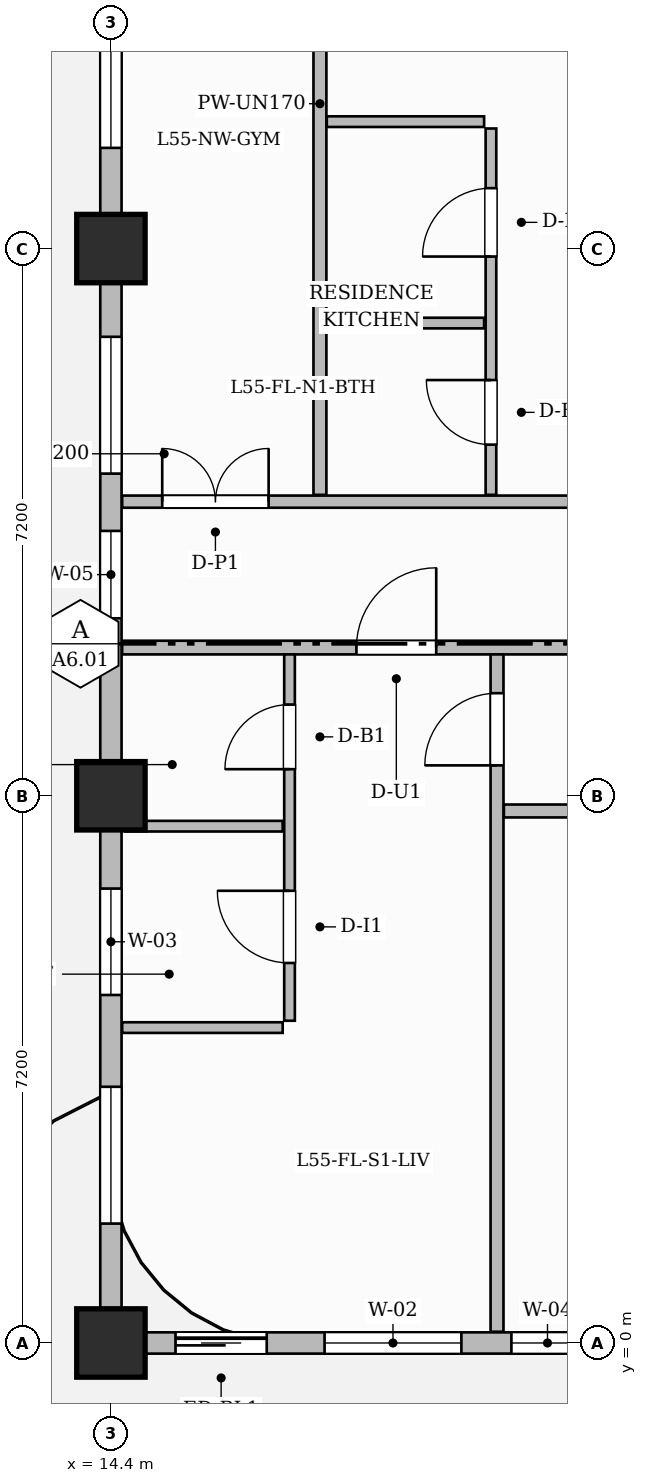
"""IFC4 building model, lengths in metres.
Left out: names, types, materials, properties, quantities, classifications, styles, units other than length and angle.
Written with IfcOpenShell. Run it as: python <this file> out.ifc"""

import sys

from ifc_helpers import new_model, si_unit, direction, frame, frame_2d, origin, origin_2d, place, context, subcontext, project, spatial, rectangle, extrude, source, transform, mapped, element, fill, save


model = new_model("IFC4")
c1 = context("Model", 3, precision=1e-05, world=origin(), true_north=direction((0.0, 1.0)))
c2 = subcontext(c1, "Body", "Model", "MODEL_VIEW")
j1 = project(units=[si_unit("LENGTHUNIT", "METRE"), si_unit("PLANEANGLEUNIT", "RADIAN")], contexts=[c1])
p1 = place(None, origin())
s1 = spatial("IfcSite", under=j1, at=p1, CompositionType="ELEMENT")
p2 = place(p1, origin())
s2 = spatial("IfcBuilding", under=s1, at=p2, CompositionType="ELEMENT")
p3 = place(p2, frame((0.0, 0.0, 221.15)))
s3 = spatial("IfcBuildingStorey", under=s2, at=p3, CompositionType="ELEMENT", Elevation=221.15)
m1 = source(origin(), c2, "Body", "SweptSolid", [
    extrude(rectangle(XDim=0.9, YDim=0.9, at=origin_2d()), origin(), (0.0, 0.0, 1.0), 3.85),
])
for number, where, z_axis, x_axis in (
    (1, (14.4, 0.0, 0.0), (0.0, 0.0, 1.0), (1.0, 0.0, 0.0)),
    (2, (14.4, 7.2, 0.0), (0.0, 0.0, 1.0), (1.0, 0.0, 0.0)),
    (3, (14.4, 14.4, 0.0), (0.0, 0.0, 1.0), (1.0, 0.0, 0.0)),
):
    element("IfcColumn", number, at=place(p3, frame(where, z_axis=z_axis, x_axis=x_axis)), inside=s3, PredefinedType="COLUMN", context=c2, shape_type="MappedRepresentation", body=[
        mapped(m1, transform((0.0, 0.0, 0.0), scale=1.0)),
    ])
p4 = place(p3, frame((14.548, 9.15, 0.0), z_axis=(0.0, 0.0, 1.0), x_axis=(1.0, 0.0, 0.0)))
e4 = element("IfcWall", 4, at=p4, inside=s3, PredefinedType="PARTITIONING", context=c2, shape_type="SweptSolid", body=[
    extrude(rectangle(XDim=15.562, YDim=0.18, at=frame_2d((7.781, 0.0))), origin(), (0.0, 0.0, 1.0), 3.6),
])
p5 = place(p4, frame((3.082, 0.0, 0.0)))
e5 = element("IfcOpeningElement", 5, at=p5, cuts=e4, PredefinedType="OPENING", context=c2, shape_type="SweptSolid", body=[
    extrude(rectangle(XDim=1.05, YDim=2.25, at=frame_2d((0.525, 1.125))), frame((0.0, 0.1, 0.0), z_axis=(0.0, -1.0, 0.0), x_axis=(1.0, 0.0, 0.0)), (0.0, 0.0, 1.0), 0.2),
])
p6 = place(p3, frame((14.548, 11.07, 0.0), z_axis=(0.0, 0.0, 1.0), x_axis=(1.0, 0.0, 0.0)))
e6 = element("IfcWall", 6, at=p6, inside=s3, PredefinedType="PARTITIONING", context=c2, shape_type="SweptSolid", body=[
    extrude(rectangle(XDim=15.562, YDim=0.16, at=frame_2d((7.781, 0.0))), origin(), (0.0, 0.0, 1.0), 3.6),
])
p7 = place(p6, frame((0.527, 0.0, 0.0)))
e7 = element("IfcOpeningElement", 7, at=p7, cuts=e6, PredefinedType="OPENING", context=c2, shape_type="SweptSolid", body=[
    extrude(rectangle(XDim=1.4, YDim=2.35, at=frame_2d((0.7, 1.175))), frame((0.0, 0.09, 0.0), z_axis=(0.0, -1.0, 0.0), x_axis=(1.0, 0.0, 0.0)), (0.0, 0.0, 1.0), 0.18),
])
p8 = place(p6, frame((6.527, 0.0, 0.0)))
e8 = element("IfcOpeningElement", 8, at=p8, cuts=e6, PredefinedType="OPENING", context=c2, shape_type="SweptSolid", body=[
    extrude(rectangle(XDim=1.05, YDim=2.25, at=frame_2d((0.525, 1.125))), frame((0.0, 0.09, 0.0), z_axis=(0.0, -1.0, 0.0), x_axis=(1.0, 0.0, 0.0)), (0.0, 0.0, 1.0), 0.18),
])
p9 = place(p3, frame((16.75, 4.24, 0.0), z_axis=(0.0, 0.0, 1.0), x_axis=(0.0, 1.0, 0.0)))
e9 = element("IfcWall", 9, at=p9, inside=s3, PredefinedType="PARTITIONING", context=c2, shape_type="SweptSolid", body=[
    extrude(rectangle(XDim=4.82, YDim=0.14, at=frame_2d((2.41, 0.0))), origin(), (0.0, 0.0, 1.0), 3.6),
])
p10 = place(p9, frame((0.76, 0.0, 0.0)))
e10 = element("IfcOpeningElement", 10, at=p10, cuts=e9, PredefinedType="OPENING", context=c2, shape_type="SweptSolid", body=[
    extrude(rectangle(XDim=0.95, YDim=2.15, at=frame_2d((0.475, 1.075))), frame((0.0, 0.08, 0.0), z_axis=(0.0, -1.0, 0.0), x_axis=(1.0, 0.0, 0.0)), (0.0, 0.0, 1.0), 0.16),
])
p11 = place(p9, frame((3.31, 0.0, 0.0)))
e11 = element("IfcOpeningElement", 11, at=p11, cuts=e9, PredefinedType="OPENING", context=c2, shape_type="SweptSolid", body=[
    extrude(rectangle(XDim=0.85, YDim=2.1, at=frame_2d((0.425, 1.05))), frame((0.0, 0.08, 0.0), z_axis=(0.0, -1.0, 0.0), x_axis=(1.0, 0.0, 0.0)), (0.0, 0.0, 1.0), 0.16),
])
p12 = place(p3, frame((14.59, 6.8, 0.0), z_axis=(0.0, 0.0, 1.0), x_axis=(1.0, 0.0, 0.0)))
e12 = element("IfcWall", 12, at=p12, inside=s3, PredefinedType="PARTITIONING", context=c2, shape_type="SweptSolid", body=[
    extrude(rectangle(XDim=2.07, YDim=0.14, at=frame_2d((1.035, 0.0))), origin(), (0.0, 0.0, 1.0), 3.6),
])
p13 = place(p3, frame((14.548, 4.15, 0.0), z_axis=(0.0, 0.0, 1.0), x_axis=(1.0, 0.0, 0.0)))
e13 = element("IfcWall", 13, at=p13, inside=s3, PredefinedType="PARTITIONING", context=c2, shape_type="SweptSolid", body=[
    extrude(rectangle(XDim=2.112, YDim=0.14, at=frame_2d((1.056, 0.0))), origin(), (0.0, 0.0, 1.0), 3.6),
])
p14 = place(p3, frame((19.48, 0.148, 0.0), z_axis=(0.0, 0.0, 1.0), x_axis=(0.0, 1.0, 0.0)))
e14 = element("IfcWall", 14, at=p14, inside=s3, PredefinedType="PARTITIONING", context=c2, shape_type="SweptSolid", body=[
    extrude(rectangle(XDim=8.912, YDim=0.17, at=frame_2d((4.456, 0.0))), origin(), (0.0, 0.0, 1.0), 3.6),
])
p15 = place(p14, frame((7.452, 0.0, 0.0)))
e15 = element("IfcOpeningElement", 15, at=p15, cuts=e14, PredefinedType="OPENING", context=c2, shape_type="SweptSolid", body=[
    extrude(rectangle(XDim=0.95, YDim=2.15, at=frame_2d((0.475, 1.075))), frame((0.0, 0.095, 0.0), z_axis=(0.0, -1.0, 0.0), x_axis=(1.0, 0.0, 0.0)), (0.0, 0.0, 1.0), 0.19),
])
p16 = place(p3, frame((19.57, 7.0, 0.0), z_axis=(0.0, 0.0, 1.0), x_axis=(1.0, 0.0, 0.0)))
e16 = element("IfcWall", 16, at=p16, inside=s3, PredefinedType="PARTITIONING", context=c2, shape_type="SweptSolid", body=[
    extrude(rectangle(XDim=10.54, YDim=0.17, at=frame_2d((5.27, 0.0))), origin(), (0.0, 0.0, 1.0), 3.135),
])
p17 = place(p16, frame((2.655, 0.0, 0.0)))
e17 = element("IfcOpeningElement", 17, at=p17, cuts=e16, PredefinedType="OPENING", context=c2, shape_type="SweptSolid", body=[
    extrude(rectangle(XDim=0.95, YDim=2.15, at=frame_2d((0.475, 1.075))), frame((0.0, 0.095, 0.0), z_axis=(0.0, -1.0, 0.0), x_axis=(1.0, 0.0, 0.0)), (0.0, 0.0, 1.0), 0.19),
])
p18 = place(p16, frame((6.425, 0.0, 0.0)))
e18 = element("IfcOpeningElement", 18, at=p18, cuts=e16, PredefinedType="OPENING", context=c2, shape_type="SweptSolid", body=[
    extrude(rectangle(XDim=0.95, YDim=2.15, at=frame_2d((0.475, 1.075))), frame((0.0, 0.095, 0.0), z_axis=(0.0, -1.0, 0.0), x_axis=(1.0, 0.0, 0.0)), (0.0, 0.0, 1.0), 0.19),
])
p19 = place(p3, frame((17.15, 11.16, 0.0), z_axis=(0.0, 0.0, 1.0), x_axis=(0.0, 1.0, 0.0)))
e19 = element("IfcWall", 19, at=p19, inside=s3, PredefinedType="PARTITIONING", context=c2, shape_type="SweptSolid", body=[
    extrude(rectangle(XDim=10.292, YDim=0.17, at=frame_2d((5.146, 0.0))), origin(), (0.0, 0.0, 1.0), 3.6),
])
p20 = place(p3, frame((19.4, 11.16, 0.0), z_axis=(0.0, 0.0, 1.0), x_axis=(0.0, 1.0, 0.0)))
e20 = element("IfcWall", 20, at=p20, inside=s3, PredefinedType="PARTITIONING", context=c2, shape_type="SweptSolid", body=[
    extrude(rectangle(XDim=4.82, YDim=0.14, at=frame_2d((2.41, 0.0))), origin(), (0.0, 0.0, 1.0), 3.6),
])
p21 = place(p20, frame((0.66, 0.0, 0.0)))
e21 = element("IfcOpeningElement", 21, at=p21, cuts=e20, PredefinedType="OPENING", context=c2, shape_type="SweptSolid", body=[
    extrude(rectangle(XDim=0.85, YDim=2.1, at=frame_2d((0.425, 1.05))), frame((0.0, 0.08, 0.0), z_axis=(0.0, -1.0, 0.0), x_axis=(1.0, 0.0, 0.0)), (0.0, 0.0, 1.0), 0.16),
])
p22 = place(p20, frame((3.135, 0.0, 0.0)))
e22 = element("IfcOpeningElement", 22, at=p22, cuts=e20, PredefinedType="OPENING", context=c2, shape_type="SweptSolid", body=[
    extrude(rectangle(XDim=0.9, YDim=2.15, at=frame_2d((0.45, 1.075))), frame((0.0, 0.08, 0.0), z_axis=(0.0, -1.0, 0.0), x_axis=(1.0, 0.0, 0.0)), (0.0, 0.0, 1.0), 0.16),
])
for number, where, z_axis, x_axis in (
    (23, (17.24, 13.42, 0.0), (0.0, 0.0, 1.0), (1.0, 0.0, 0.0)),
    (24, (17.24, 16.07, 0.0), (0.0, 0.0, 1.0), (1.0, 0.0, 0.0)),
):
    element("IfcWall", number, at=place(p3, frame(where, z_axis=z_axis, x_axis=x_axis)), inside=s3, PredefinedType="PARTITIONING", context=c2, shape_type="SweptSolid", body=[
        extrude(rectangle(XDim=2.07, YDim=0.14, at=frame_2d((1.035, 0.0))), origin(), (0.0, 0.0, 1.0), 3.6),
    ])
p23 = place(p3, frame((14.4, 0.0, 0.0), z_axis=(0.0, 0.0, 1.0), x_axis=(1.0, 0.0, 0.0)))
e25 = element("IfcWall", 25, at=p23, inside=s3, PredefinedType="SOLIDWALL", context=c2, shape_type="SweptSolid", body=[
    extrude(rectangle(XDim=35.4, YDim=0.28, at=frame_2d((17.7, 0.0))), origin(), (0.0, 0.0, 1.0), 3.135),
])
p24 = place(p23, frame((0.85, 0.0, 0.0)))
e26 = element("IfcOpeningElement", 26, at=p24, cuts=e25, PredefinedType="OPENING", context=c2, shape_type="SweptSolid", body=[
    extrude(rectangle(XDim=1.2, YDim=2.2, at=frame_2d((0.6, 1.1))), frame((0.0, 0.15, 0.0), z_axis=(0.0, -1.0, 0.0), x_axis=(1.0, 0.0, 0.0)), (0.0, 0.0, 1.0), 0.3),
])
p25 = place(p23, frame((2.811, 0.0, 0.8)))
e27 = element("IfcOpeningElement", 27, at=p25, cuts=e25, PredefinedType="OPENING", context=c2, shape_type="SweptSolid", body=[
    extrude(rectangle(XDim=1.8, YDim=1.85, at=frame_2d((0.9, 0.925))), frame((0.0, 0.15, 0.0), z_axis=(0.0, -1.0, 0.0), x_axis=(1.0, 0.0, 0.0)), (0.0, 0.0, 1.0), 0.3),
])
p26 = place(p23, frame((5.269, 0.0, 0.8)))
e28 = element("IfcOpeningElement", 28, at=p26, cuts=e25, PredefinedType="OPENING", context=c2, shape_type="SweptSolid", body=[
    extrude(rectangle(XDim=0.95, YDim=1.75, at=frame_2d((0.475, 0.875))), frame((0.0, 0.15, 0.0), z_axis=(0.0, -1.0, 0.0), x_axis=(1.0, 0.0, 0.0)), (0.0, 0.0, 1.0), 0.3),
])
p27 = place(p23, frame((8.516, 0.0, 0.8)))
e29 = element("IfcOpeningElement", 29, at=p27, cuts=e25, PredefinedType="OPENING", context=c2, shape_type="SweptSolid", body=[
    extrude(rectangle(XDim=1.4, YDim=1.85, at=frame_2d((0.7, 0.925))), frame((0.0, 0.15, 0.0), z_axis=(0.0, -1.0, 0.0), x_axis=(1.0, 0.0, 0.0)), (0.0, 0.0, 1.0), 0.3),
])
p28 = place(p23, frame((11.124, 0.0, 0.8)))
e30 = element("IfcOpeningElement", 30, at=p28, cuts=e25, PredefinedType="OPENING", context=c2, shape_type="SweptSolid", body=[
    extrude(rectangle(XDim=1.8, YDim=1.85, at=frame_2d((0.9, 0.925))), frame((0.0, 0.15, 0.0), z_axis=(0.0, -1.0, 0.0), x_axis=(1.0, 0.0, 0.0)), (0.0, 0.0, 1.0), 0.3),
])
p29 = place(p23, frame((16.804, 0.0, 0.8)))
e31 = element("IfcOpeningElement", 31, at=p29, cuts=e25, PredefinedType="OPENING", context=c2, shape_type="SweptSolid", body=[
    extrude(rectangle(XDim=1.8, YDim=1.85, at=frame_2d((0.9, 0.925))), frame((0.0, 0.15, 0.0), z_axis=(0.0, -1.0, 0.0), x_axis=(1.0, 0.0, 0.0)), (0.0, 0.0, 1.0), 0.3),
])
p30 = place(p23, frame((21.725, 0.0, 0.8)))
e32 = element("IfcOpeningElement", 32, at=p30, cuts=e25, PredefinedType="OPENING", context=c2, shape_type="SweptSolid", body=[
    extrude(rectangle(XDim=1.8, YDim=1.85, at=frame_2d((0.9, 0.925))), frame((0.0, 0.15, 0.0), z_axis=(0.0, -1.0, 0.0), x_axis=(1.0, 0.0, 0.0)), (0.0, 0.0, 1.0), 0.3),
])
p31 = place(p23, frame((24.475, 0.0, 0.8)))
e33 = element("IfcOpeningElement", 33, at=p31, cuts=e25, PredefinedType="OPENING", context=c2, shape_type="SweptSolid", body=[
    extrude(rectangle(XDim=1.8, YDim=1.85, at=frame_2d((0.9, 0.925))), frame((0.0, 0.15, 0.0), z_axis=(0.0, -1.0, 0.0), x_axis=(1.0, 0.0, 0.0)), (0.0, 0.0, 1.0), 0.3),
])
p32 = place(p23, frame((29.075, 0.0, 0.8)))
e34 = element("IfcOpeningElement", 34, at=p32, cuts=e25, PredefinedType="OPENING", context=c2, shape_type="SweptSolid", body=[
    extrude(rectangle(XDim=1.8, YDim=1.85, at=frame_2d((0.9, 0.925))), frame((0.0, 0.15, 0.0), z_axis=(0.0, -1.0, 0.0), x_axis=(1.0, 0.0, 0.0)), (0.0, 0.0, 1.0), 0.3),
])
p33 = place(p23, frame((32.125, 0.0, 0.8)))
e35 = element("IfcOpeningElement", 35, at=p33, cuts=e25, PredefinedType="OPENING", context=c2, shape_type="SweptSolid", body=[
    extrude(rectangle(XDim=1.8, YDim=1.85, at=frame_2d((0.9, 0.925))), frame((0.0, 0.15, 0.0), z_axis=(0.0, -1.0, 0.0), x_axis=(1.0, 0.0, 0.0)), (0.0, 0.0, 1.0), 0.3),
])
p34 = place(p3, frame((14.4, 0.05, 0.0), z_axis=(0.0, 0.0, 1.0), x_axis=(0.0, 1.0, 0.0)))
e36 = element("IfcWall", 36, at=p34, inside=s3, PredefinedType="SOLIDWALL", context=c2, shape_type="SweptSolid", body=[
    extrude(rectangle(XDim=21.5, YDim=0.28, at=frame_2d((10.75, 0.0))), origin(), (0.0, 0.0, 1.0), 3.135),
])
p35 = place(p34, frame((1.521, 0.0, 0.8)))
e37 = element("IfcOpeningElement", 37, at=p35, cuts=e36, PredefinedType="OPENING", context=c2, shape_type="SweptSolid", body=[
    extrude(rectangle(XDim=1.8, YDim=1.85, at=frame_2d((0.9, 0.925))), frame((0.0, 0.15, 0.0), z_axis=(0.0, -1.0, 0.0), x_axis=(1.0, 0.0, 0.0)), (0.0, 0.0, 1.0), 0.3),
])
p36 = place(p34, frame((4.529, 0.0, 0.8)))
e38 = element("IfcOpeningElement", 38, at=p36, cuts=e36, PredefinedType="OPENING", context=c2, shape_type="SweptSolid", body=[
    extrude(rectangle(XDim=1.4, YDim=1.85, at=frame_2d((0.7, 0.925))), frame((0.0, 0.15, 0.0), z_axis=(0.0, -1.0, 0.0), x_axis=(1.0, 0.0, 0.0)), (0.0, 0.0, 1.0), 0.3),
])
p37 = place(p34, frame((9.485, 0.0, 0.8)))
e39 = element("IfcOpeningElement", 39, at=p37, cuts=e36, PredefinedType="OPENING", context=c2, shape_type="SweptSolid", body=[
    extrude(rectangle(XDim=1.15, YDim=1.8, at=frame_2d((0.575, 0.9))), frame((0.0, 0.15, 0.0), z_axis=(0.0, -1.0, 0.0), x_axis=(1.0, 0.0, 0.0)), (0.0, 0.0, 1.0), 0.3),
])
p38 = place(p34, frame((11.389, 0.0, 0.8)))
e40 = element("IfcOpeningElement", 40, at=p38, cuts=e36, PredefinedType="OPENING", context=c2, shape_type="SweptSolid", body=[
    extrude(rectangle(XDim=1.8, YDim=1.85, at=frame_2d((0.9, 0.925))), frame((0.0, 0.15, 0.0), z_axis=(0.0, -1.0, 0.0), x_axis=(1.0, 0.0, 0.0)), (0.0, 0.0, 1.0), 0.3),
])
p39 = place(p34, frame((15.675, 0.0, 0.8)))
e41 = element("IfcOpeningElement", 41, at=p39, cuts=e36, PredefinedType="OPENING", context=c2, shape_type="SweptSolid", body=[
    extrude(rectangle(XDim=1.8, YDim=1.85, at=frame_2d((0.9, 0.925))), frame((0.0, 0.15, 0.0), z_axis=(0.0, -1.0, 0.0), x_axis=(1.0, 0.0, 0.0)), (0.0, 0.0, 1.0), 0.3),
])
p40 = place(p34, frame((18.425, 0.0, 0.8)))
e42 = element("IfcOpeningElement", 42, at=p40, cuts=e36, PredefinedType="OPENING", context=c2, shape_type="SweptSolid", body=[
    extrude(rectangle(XDim=1.8, YDim=1.85, at=frame_2d((0.9, 0.925))), frame((0.0, 0.15, 0.0), z_axis=(0.0, -1.0, 0.0), x_axis=(1.0, 0.0, 0.0)), (0.0, 0.0, 1.0), 0.3),
])
m2 = source(origin(), c2, "Body", "SweptSolid", [
    extrude(rectangle(XDim=0.95, YDim=2.15, at=frame_2d((0.475, 1.075))), frame((0.0, 0.025, 0.0), z_axis=(0.0, -1.0, 0.0), x_axis=(1.0, 0.0, 0.0)), (0.0, 0.0, 1.0), 0.05),
])
p41 = place(p10, origin())
e43 = element("IfcDoor", 43, at=p41, inside=s3, OperationType="SINGLE_SWING_RIGHT", PredefinedType="DOOR", context=c2, shape_type="MappedRepresentation", body=[
    mapped(m2, transform((0.0, 0.0, 0.0), scale=1.0)),
])
fill(e10, e43)
m3 = source(origin(), c2, "Body", "SweptSolid", [
    extrude(rectangle(XDim=0.85, YDim=2.1, at=frame_2d((0.425, 1.05))), frame((0.0, 0.025, 0.0), z_axis=(0.0, -1.0, 0.0), x_axis=(1.0, 0.0, 0.0)), (0.0, 0.0, 1.0), 0.05),
])
p42 = place(p11, origin())
e44 = element("IfcDoor", 44, at=p42, inside=s3, OperationType="SINGLE_SWING_LEFT", PredefinedType="DOOR", context=c2, shape_type="MappedRepresentation", body=[
    mapped(m3, transform((0.0, 0.0, 0.0), scale=1.0)),
])
fill(e11, e44)
m4 = source(origin(), c2, "Body", "SweptSolid", [
    extrude(rectangle(XDim=1.05, YDim=2.25, at=frame_2d((0.525, 1.125))), frame((0.0, 0.025, 0.0), z_axis=(0.0, -1.0, 0.0), x_axis=(1.0, 0.0, 0.0)), (0.0, 0.0, 1.0), 0.05),
])
p43 = place(p5, origin())
e45 = element("IfcDoor", 45, at=p43, inside=s3, OperationType="SINGLE_SWING_RIGHT", PredefinedType="DOOR", context=c2, shape_type="MappedRepresentation", body=[
    mapped(m4, transform((0.0, 0.0, 0.0), scale=1.0)),
])
fill(e5, e45)
p44 = place(p15, origin())
e46 = element("IfcDoor", 46, at=p44, inside=s3, OperationType="SINGLE_SWING_LEFT", PredefinedType="DOOR", context=c2, shape_type="MappedRepresentation", body=[
    mapped(m2, transform((0.0, 0.0, 0.0), scale=1.0)),
])
fill(e15, e46)
m5 = source(origin(), c2, "Body", "SweptSolid", [
    extrude(rectangle(XDim=1.4, YDim=2.35, at=frame_2d((0.7, 1.175))), frame((0.0, 0.025, 0.0), z_axis=(0.0, -1.0, 0.0), x_axis=(1.0, 0.0, 0.0)), (0.0, 0.0, 1.0), 0.05),
])
p45 = place(p7, origin())
e47 = element("IfcDoor", 47, at=p45, inside=s3, OperationType="DOUBLE_DOOR_SINGLE_SWING", PredefinedType="DOOR", context=c2, shape_type="MappedRepresentation", body=[
    mapped(m5, transform((0.0, 0.0, 0.0), scale=1.0)),
])
fill(e7, e47)
p46 = place(p21, origin())
e48 = element("IfcDoor", 48, at=p46, inside=s3, OperationType="SINGLE_SWING_RIGHT", PredefinedType="DOOR", context=c2, shape_type="MappedRepresentation", body=[
    mapped(m3, transform((0.0, 0.0, 0.0), scale=1.0)),
])
fill(e21, e48)
m6 = source(origin(), c2, "Body", "SweptSolid", [
    extrude(rectangle(XDim=0.9, YDim=2.15, at=frame_2d((0.45, 1.075))), frame((0.0, 0.025, 0.0), z_axis=(0.0, -1.0, 0.0), x_axis=(1.0, 0.0, 0.0)), (0.0, 0.0, 1.0), 0.05),
])
p47 = place(p22, origin())
e49 = element("IfcDoor", 49, at=p47, inside=s3, OperationType="SINGLE_SWING_LEFT", PredefinedType="DOOR", context=c2, shape_type="MappedRepresentation", body=[
    mapped(m6, transform((0.0, 0.0, 0.0), scale=1.0)),
])
fill(e22, e49)
m7 = source(origin(), c2, "Body", "SweptSolid", [
    extrude(rectangle(XDim=1.2, YDim=2.2, at=frame_2d((0.6, 1.1))), frame((0.0, 0.025, 0.0), z_axis=(0.0, -1.0, 0.0), x_axis=(1.0, 0.0, 0.0)), (0.0, 0.0, 1.0), 0.05),
])
p48 = place(p24, origin())
e50 = element("IfcDoor", 50, at=p48, inside=s3, OperationType="SLIDING_TO_LEFT", PredefinedType="DOOR", context=c2, shape_type="MappedRepresentation", body=[
    mapped(m7, transform((0.0, 0.0, 0.0), scale=1.0)),
])
fill(e26, e50)
m8 = source(origin(), c2, "Body", "SweptSolid", [
    extrude(rectangle(XDim=1.8, YDim=1.85, at=frame_2d((0.9, 0.925))), frame((0.0, 0.03, 0.0), z_axis=(0.0, -1.0, 0.0), x_axis=(1.0, 0.0, 0.0)), (0.0, 0.0, 1.0), 0.06),
])
p49 = place(p25, origin())
e51 = element("IfcWindow", 51, at=p49, inside=s3, PartitioningType="DOUBLE_PANEL_VERTICAL", PredefinedType="WINDOW", context=c2, shape_type="MappedRepresentation", body=[
    mapped(m8, transform((0.0, 0.0, 0.0), scale=1.0)),
])
fill(e27, e51)
m9 = source(origin(), c2, "Body", "SweptSolid", [
    extrude(rectangle(XDim=0.95, YDim=1.75, at=frame_2d((0.475, 0.875))), frame((0.0, 0.03, 0.0), z_axis=(0.0, -1.0, 0.0), x_axis=(1.0, 0.0, 0.0)), (0.0, 0.0, 1.0), 0.06),
])
p50 = place(p26, origin())
e52 = element("IfcWindow", 52, at=p50, inside=s3, PartitioningType="SINGLE_PANEL", PredefinedType="WINDOW", context=c2, shape_type="MappedRepresentation", body=[
    mapped(m9, transform((0.0, 0.0, 0.0), scale=1.0)),
])
fill(e28, e52)
p51 = place(p35, origin())
e53 = element("IfcWindow", 53, at=p51, inside=s3, PartitioningType="DOUBLE_PANEL_VERTICAL", PredefinedType="WINDOW", context=c2, shape_type="MappedRepresentation", body=[
    mapped(m8, transform((0.0, 0.0, 0.0), scale=1.0)),
])
fill(e37, e53)
m10 = source(origin(), c2, "Body", "SweptSolid", [
    extrude(rectangle(XDim=1.4, YDim=1.85, at=frame_2d((0.7, 0.925))), frame((0.0, 0.03, 0.0), z_axis=(0.0, -1.0, 0.0), x_axis=(1.0, 0.0, 0.0)), (0.0, 0.0, 1.0), 0.06),
])
p52 = place(p36, origin())
e54 = element("IfcWindow", 54, at=p52, inside=s3, PartitioningType="SINGLE_PANEL", PredefinedType="WINDOW", context=c2, shape_type="MappedRepresentation", body=[
    mapped(m10, transform((0.0, 0.0, 0.0), scale=1.0)),
])
fill(e38, e54)
m11 = source(origin(), c2, "Body", "SweptSolid", [
    extrude(rectangle(XDim=1.15, YDim=1.8, at=frame_2d((0.575, 0.9))), frame((0.0, 0.03, 0.0), z_axis=(0.0, -1.0, 0.0), x_axis=(1.0, 0.0, 0.0)), (0.0, 0.0, 1.0), 0.06),
])
p53 = place(p37, origin())
e55 = element("IfcWindow", 55, at=p53, inside=s3, PartitioningType="SINGLE_PANEL", PredefinedType="WINDOW", context=c2, shape_type="MappedRepresentation", body=[
    mapped(m11, transform((0.0, 0.0, 0.0), scale=1.0)),
])
fill(e39, e55)
p54 = place(p38, origin())
e56 = element("IfcWindow", 56, at=p54, inside=s3, PartitioningType="DOUBLE_PANEL_VERTICAL", PredefinedType="WINDOW", context=c2, shape_type="MappedRepresentation", body=[
    mapped(m8, transform((0.0, 0.0, 0.0), scale=1.0)),
])
fill(e40, e56)
p55 = place(p39, origin())
e57 = element("IfcWindow", 57, at=p55, inside=s3, PartitioningType="DOUBLE_PANEL_VERTICAL", PredefinedType="WINDOW", context=c2, shape_type="MappedRepresentation", body=[
    mapped(m8, transform((0.0, 0.0, 0.0), scale=1.0)),
])
fill(e41, e57)
save(model, sys.argv[1])
